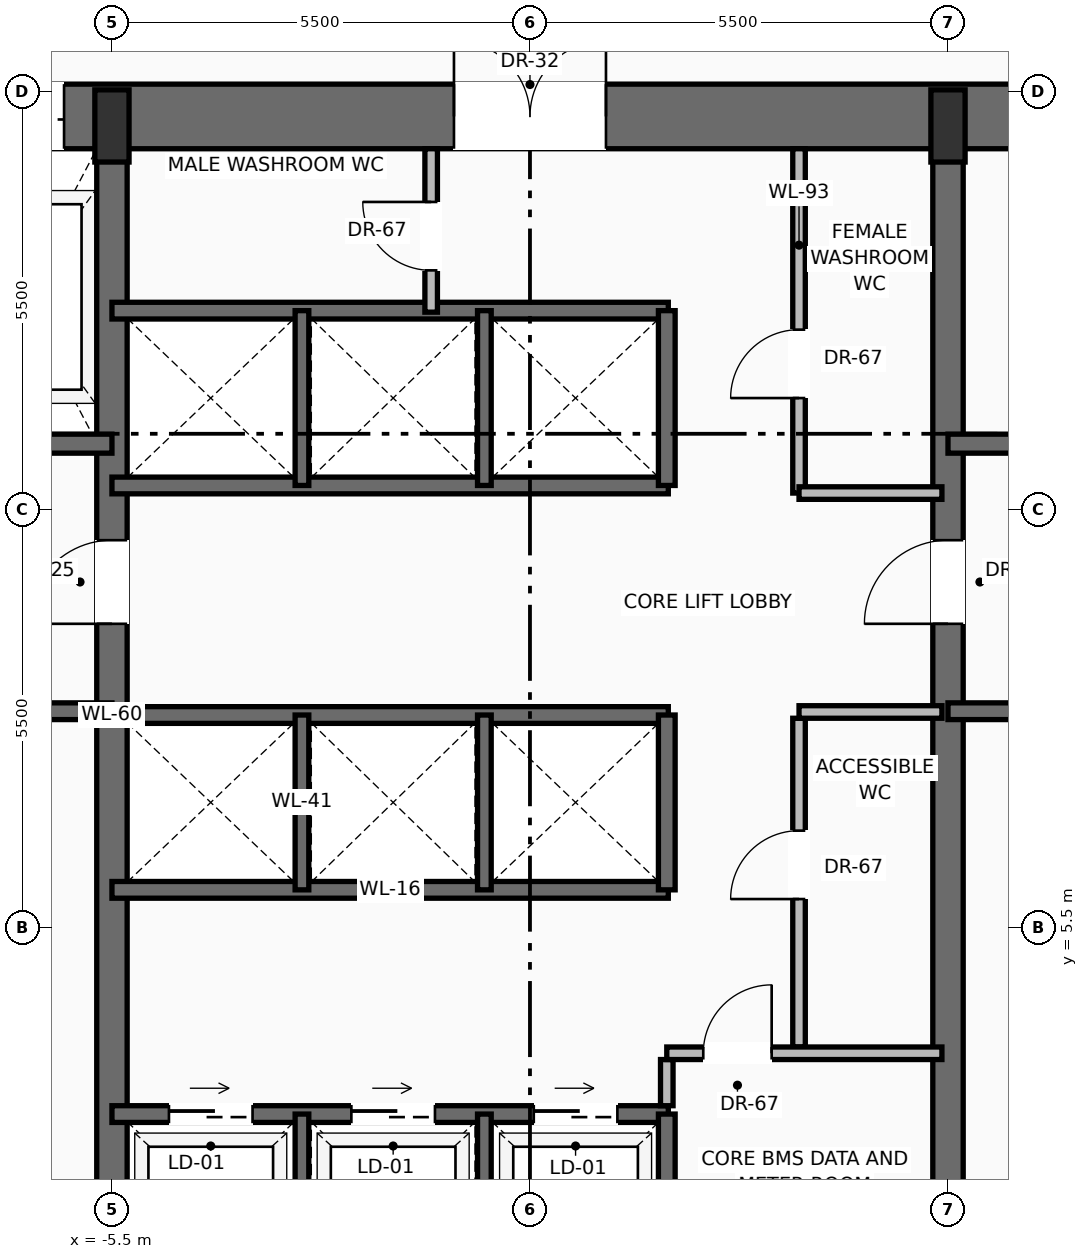
"""IFC4 building model, lengths in metres.
Left out: names, types, materials, properties, quantities, classifications, styles, units other than length and angle.
Written with IfcOpenShell. Run it as: python <this file> out.ifc"""

import sys

from ifc_helpers import new_model, si_unit, direction, frame, frame_2d, origin, origin_2d, place, context, subcontext, project, spatial, rectangle, extrude, source, transform, mapped, element, fill, save


model = new_model("IFC4")
c1 = context("Model", 3, precision=1e-05, world=origin(), true_north=direction((0.0, 1.0)))
c2 = subcontext(c1, "Body", "Model", "MODEL_VIEW")
j1 = project(units=[si_unit("LENGTHUNIT", "METRE"), si_unit("PLANEANGLEUNIT", "RADIAN")], contexts=[c1])
p1 = place(None, origin())
s1 = spatial("IfcSite", under=j1, at=p1, CompositionType="ELEMENT")
p2 = place(p1, origin())
s2 = spatial("IfcBuilding", under=s1, at=p2, CompositionType="ELEMENT")
p3 = place(p2, frame((0.0, 0.0, 27.5)))
s3 = spatial("IfcBuildingStorey", under=s2, at=p3, CompositionType="ELEMENT", Elevation=27.5)
p4 = place(p3, frame((-11.0, 16.175, 0.0), z_axis=(0.0, 0.0, 1.0), x_axis=(1.0, 0.0, 0.0)))
e1 = element("IfcWall", 1, at=p4, inside=s3, PredefinedType="SHEAR", context=c2, shape_type="SweptSolid", body=[
    extrude(rectangle(XDim=22.0, YDim=0.85, at=frame_2d((11.0, 0.0))), origin(), (0.0, 0.0, 1.0), 3.45),
])
p5 = place(p4, frame((3.57, 0.0, 0.0)))
e2 = element("IfcOpeningElement", 2, at=p5, cuts=e1, PredefinedType="OPENING", context=c2, shape_type="SweptSolid", body=[
    extrude(rectangle(XDim=1.3, YDim=2.3, at=frame_2d((0.65, 1.15))), frame((0.0, 0.435, 0.0), z_axis=(0.0, -1.0, 0.0), x_axis=(1.0, 0.0, 0.0)), (0.0, 0.0, 1.0), 0.87),
])
p6 = place(p4, frame((10.0, 0.0, 0.0)))
e3 = element("IfcOpeningElement", 3, at=p6, cuts=e1, PredefinedType="OPENING", context=c2, shape_type="SweptSolid", body=[
    extrude(rectangle(XDim=2.0, YDim=2.4, at=frame_2d((1.0, 1.2))), frame((0.0, 0.435, 0.0), z_axis=(0.0, -1.0, 0.0), x_axis=(1.0, 0.0, 0.0)), (0.0, 0.0, 1.0), 0.87),
])
p7 = place(p3, frame((-5.5, 0.425, 0.0), z_axis=(0.0, 0.0, 1.0), x_axis=(0.0, 1.0, 0.0)))
e4 = element("IfcWall", 4, at=p7, inside=s3, PredefinedType="SHEAR", context=c2, shape_type="SweptSolid", body=[
    extrude(rectangle(XDim=15.75, YDim=0.4, at=frame_2d((7.875, 0.0))), origin(), (0.0, 0.0, 1.0), 3.45),
])
p8 = place(p7, frame((9.075, 0.0, 0.0)))
e5 = element("IfcOpeningElement", 5, at=p8, cuts=e4, PredefinedType="OPENING", context=c2, shape_type="SweptSolid", body=[
    extrude(rectangle(XDim=1.1, YDim=2.2, at=frame_2d((0.55, 1.1))), frame((0.0, 0.21, 0.0), z_axis=(0.0, -1.0, 0.0), x_axis=(1.0, 0.0, 0.0)), (0.0, 0.0, 1.0), 0.42),
])
p9 = place(p3, frame((5.5, 0.425, 0.0), z_axis=(0.0, 0.0, 1.0), x_axis=(0.0, 1.0, 0.0)))
e6 = element("IfcWall", 6, at=p9, inside=s3, PredefinedType="SHEAR", context=c2, shape_type="SweptSolid", body=[
    extrude(rectangle(XDim=15.75, YDim=0.4, at=frame_2d((7.875, 0.0))), origin(), (0.0, 0.0, 1.0), 3.45),
])
p10 = place(p9, frame((9.075, 0.0, 0.0)))
e7 = element("IfcOpeningElement", 7, at=p10, cuts=e6, PredefinedType="OPENING", context=c2, shape_type="SweptSolid", body=[
    extrude(rectangle(XDim=1.1, YDim=2.2, at=frame_2d((0.55, 1.1))), frame((0.0, 0.21, 0.0), z_axis=(0.0, -1.0, 0.0), x_axis=(1.0, 0.0, 0.0)), (0.0, 0.0, 1.0), 0.42),
])
m1 = source(origin(), c2, "Body", "SweptSolid", [
    extrude(rectangle(XDim=0.45, YDim=0.95, at=origin_2d()), origin(), (0.0, 0.0, 1.0), 3.7),
])
for number, where, z_axis, x_axis in (
    (8, (-5.5, 16.05, 0.0), (0.0, 0.0, 1.0), (1.0, 0.0, 0.0)),
    (9, (5.5, 16.05, 0.0), (0.0, 0.0, 1.0), (1.0, 0.0, 0.0)),
):
    element("IfcColumn", number, at=place(p3, frame(where, z_axis=z_axis, x_axis=x_axis)), inside=s3, PredefinedType="PILASTER", context=c2, shape_type="MappedRepresentation", body=[
        mapped(m1, transform((0.0, 0.0, 0.0), scale=1.0)),
    ])
p11 = place(p3, frame((-5.5, 8.35, 0.0), z_axis=(0.0, 0.0, 1.0), x_axis=(-1.0, 0.0, 0.0)))
e10 = element("IfcWall", 10, at=p11, inside=s3, PredefinedType="SOLIDWALL", context=c2, shape_type="SweptSolid", body=[
    extrude(rectangle(XDim=4.65, YDim=0.22, at=frame_2d((2.325, 0.0))), origin(), (0.0, 0.0, 1.0), 3.45),
])
p12 = place(p11, frame((2.5, 0.0, 0.0)))
e11 = element("IfcOpeningElement", 11, at=p12, cuts=e10, PredefinedType="OPENING", context=c2, shape_type="SweptSolid", body=[
    extrude(rectangle(XDim=1.15, YDim=2.2, at=frame_2d((0.575, 1.1))), frame((0.0, 0.12, 0.0), z_axis=(0.0, -1.0, 0.0), x_axis=(1.0, 0.0, 0.0)), (0.0, 0.0, 1.0), 0.24),
])
p13 = place(p3, frame((-5.5, 11.87, 0.0), z_axis=(0.0, 0.0, 1.0), x_axis=(-1.0, 0.0, 0.0)))
e12 = element("IfcWall", 12, at=p13, inside=s3, PredefinedType="SOLIDWALL", context=c2, shape_type="SweptSolid", body=[
    extrude(rectangle(XDim=4.65, YDim=0.25, at=frame_2d((2.325, 0.0))), origin(), (0.0, 0.0, 1.0), 3.45),
])
p14 = place(p13, frame((2.95, 0.0, 0.0)))
e13 = element("IfcOpeningElement", 13, at=p14, cuts=e12, PredefinedType="OPENING", context=c2, shape_type="SweptSolid", body=[
    extrude(rectangle(XDim=1.2, YDim=2.25, at=frame_2d((0.6, 1.125))), frame((0.0, 0.135, 0.0), z_axis=(0.0, -1.0, 0.0), x_axis=(1.0, 0.0, 0.0)), (0.0, 0.0, 1.0), 0.27),
])
p15 = place(p3, frame((10.15, 8.35, 0.0), z_axis=(0.0, 0.0, 1.0), x_axis=(-1.0, 0.0, 0.0)))
e14 = element("IfcWall", 14, at=p15, inside=s3, PredefinedType="SOLIDWALL", context=c2, shape_type="SweptSolid", body=[
    extrude(rectangle(XDim=4.65, YDim=0.22, at=frame_2d((2.325, 0.0))), origin(), (0.0, 0.0, 1.0), 3.45),
])
p16 = place(p15, frame((1.0, 0.0, 0.0)))
e15 = element("IfcOpeningElement", 15, at=p16, cuts=e14, PredefinedType="OPENING", context=c2, shape_type="SweptSolid", body=[
    extrude(rectangle(XDim=1.15, YDim=2.2, at=frame_2d((0.575, 1.1))), frame((0.0, 0.12, 0.0), z_axis=(0.0, -1.0, 0.0), x_axis=(1.0, 0.0, 0.0)), (0.0, 0.0, 1.0), 0.24),
])
p17 = place(p3, frame((10.15, 11.87, 0.0), z_axis=(0.0, 0.0, 1.0), x_axis=(-1.0, 0.0, 0.0)))
e16 = element("IfcWall", 16, at=p17, inside=s3, PredefinedType="SOLIDWALL", context=c2, shape_type="SweptSolid", body=[
    extrude(rectangle(XDim=4.65, YDim=0.25, at=frame_2d((2.325, 0.0))), origin(), (0.0, 0.0, 1.0), 3.45),
])
p18 = place(p17, frame((0.5, 0.0, 0.0)))
e17 = element("IfcOpeningElement", 17, at=p18, cuts=e16, PredefinedType="OPENING", context=c2, shape_type="SweptSolid", body=[
    extrude(rectangle(XDim=1.2, YDim=2.25, at=frame_2d((0.6, 1.125))), frame((0.0, 0.135, 0.0), z_axis=(0.0, -1.0, 0.0), x_axis=(1.0, 0.0, 0.0)), (0.0, 0.0, 1.0), 0.27),
])
p19 = place(p3, frame((-5.5, 3.05, 0.0), z_axis=(0.0, 0.0, 1.0), x_axis=(1.0, 0.0, 0.0)))
e18 = element("IfcWall", 18, at=p19, inside=s3, PredefinedType="SOLIDWALL", context=c2, shape_type="SweptSolid", body=[
    extrude(rectangle(XDim=7.32, YDim=0.22, at=frame_2d((3.66, 0.0))), origin(), (0.0, 0.0, 1.0), 3.45),
])
p20 = place(p19, frame((0.75, 0.0, 0.0)))
e19 = element("IfcOpeningElement", 19, at=p20, cuts=e18, PredefinedType="OPENING", context=c2, shape_type="SweptSolid", body=[
    extrude(rectangle(XDim=1.1, YDim=2.2, at=frame_2d((0.55, 1.1))), frame((0.0, 0.12, 0.0), z_axis=(0.0, -1.0, 0.0), x_axis=(1.0, 0.0, 0.0)), (0.0, 0.0, 1.0), 0.24),
])
p21 = place(p19, frame((3.15, 0.0, 0.0)))
e20 = element("IfcOpeningElement", 20, at=p21, cuts=e18, PredefinedType="OPENING", context=c2, shape_type="SweptSolid", body=[
    extrude(rectangle(XDim=1.1, YDim=2.2, at=frame_2d((0.55, 1.1))), frame((0.0, 0.12, 0.0), z_axis=(0.0, -1.0, 0.0), x_axis=(1.0, 0.0, 0.0)), (0.0, 0.0, 1.0), 0.24),
])
p22 = place(p19, frame((5.55, 0.0, 0.0)))
e21 = element("IfcOpeningElement", 21, at=p22, cuts=e18, PredefinedType="OPENING", context=c2, shape_type="SweptSolid", body=[
    extrude(rectangle(XDim=1.1, YDim=2.2, at=frame_2d((0.55, 1.1))), frame((0.0, 0.12, 0.0), z_axis=(0.0, -1.0, 0.0), x_axis=(1.0, 0.0, 0.0)), (0.0, 0.0, 1.0), 0.24),
])
p23 = place(p3, frame((1.8, 0.85, 0.0), z_axis=(0.0, 0.0, 1.0), x_axis=(0.0, 1.0, 0.0)))
e22 = element("IfcWall", 22, at=p23, inside=s3, PredefinedType="SOLIDWALL", context=c2, shape_type="SweptSolid", body=[
    extrude(rectangle(XDim=2.2, YDim=0.22, at=frame_2d((1.1, 0.0))), origin(), (0.0, 0.0, 1.0), 3.45),
])
for number, where, z_axis, x_axis in (
    (23, (-3.0, 0.85, 0.0), (0.0, 0.0, 1.0), (0.0, 1.0, 0.0)),
    (24, (-0.6, 0.85, 0.0), (0.0, 0.0, 1.0), (0.0, 1.0, 0.0)),
):
    element("IfcWall", number, at=place(p3, frame(where, z_axis=z_axis, x_axis=x_axis)), inside=s3, PredefinedType="SOLIDWALL", context=c2, shape_type="SweptSolid", body=[
        extrude(rectangle(XDim=2.2, YDim=0.18, at=frame_2d((1.1, 0.0))), origin(), (0.0, 0.0, 1.0), 3.45),
    ])
p24 = place(p3, frame((1.8, 3.16, 0.0), z_axis=(0.0, 0.0, 1.0), x_axis=(0.0, 1.0, 0.0)))
e25 = element("IfcWall", 25, at=p24, inside=s3, PredefinedType="PARTITIONING", context=c2, shape_type="SweptSolid", body=[
    extrude(rectangle(XDim=0.608, YDim=0.165, at=frame_2d((0.304, 0.0))), origin(), (0.0, 0.0, 1.0), 3.442),
])
p25 = place(p3, frame((3.54, 3.933, 0.0), z_axis=(0.0, 0.0, 1.0), x_axis=(0.0, 1.0, 0.0)))
e26 = element("IfcWall", 26, at=p25, inside=s3, PredefinedType="PARTITIONING", context=c2, shape_type="SweptSolid", body=[
    extrude(rectangle(XDim=4.325, YDim=0.165, at=frame_2d((2.163, 0.0))), origin(), (0.0, 0.0, 1.0), 3.442),
])
p26 = place(p25, frame((1.946, 0.0, 0.0)))
e27 = element("IfcOpeningElement", 27, at=p26, cuts=e26, PredefinedType="OPENING", context=c2, shape_type="SweptSolid", body=[
    extrude(rectangle(XDim=0.9, YDim=2.1, at=frame_2d((0.45, 1.05))), frame((0.0, 0.093, 0.0), z_axis=(0.0, -1.0, 0.0), x_axis=(1.0, 0.0, 0.0)), (0.0, 0.0, 1.0), 0.185),
])
p27 = place(p3, frame((3.54, 8.34, 0.0), z_axis=(0.0, 0.0, 1.0), x_axis=(1.0, 0.0, 0.0)))
e28 = element("IfcWall", 28, at=p27, inside=s3, PredefinedType="PARTITIONING", context=c2, shape_type="SweptSolid", body=[
    extrude(rectangle(XDim=1.88, YDim=0.165, at=frame_2d((0.94, 0.0))), origin(), (0.0, 0.0, 1.0), 3.442),
])
p28 = place(p3, frame((1.8, 3.85, 0.0), z_axis=(0.0, 0.0, 1.0), x_axis=(1.0, 0.0, 0.0)))
e29 = element("IfcWall", 29, at=p28, inside=s3, PredefinedType="PARTITIONING", context=c2, shape_type="SweptSolid", body=[
    extrude(rectangle(XDim=3.62, YDim=0.165, at=frame_2d((1.81, 0.0))), origin(), (0.0, 0.0, 1.0), 3.442),
])
p29 = place(p28, frame((0.48, 0.0, 0.0)))
e30 = element("IfcOpeningElement", 30, at=p29, cuts=e29, PredefinedType="OPENING", context=c2, shape_type="SweptSolid", body=[
    extrude(rectangle(XDim=0.9, YDim=2.1, at=frame_2d((0.45, 1.05))), frame((0.0, 0.093, 0.0), z_axis=(0.0, -1.0, 0.0), x_axis=(1.0, 0.0, 0.0)), (0.0, 0.0, 1.0), 0.185),
])
for number, where, z_axis, x_axis in (
    (31, (-5.5, 6.0, 0.0), (0.0, 0.0, 1.0), (1.0, 0.0, 0.0)),
    (32, (-5.5, 8.3, 0.0), (0.0, 0.0, 1.0), (1.0, 0.0, 0.0)),
):
    element("IfcWall", number, at=place(p3, frame(where, z_axis=z_axis, x_axis=x_axis)), inside=s3, PredefinedType="SOLIDWALL", context=c2, shape_type="SweptSolid", body=[
        extrude(rectangle(XDim=7.32, YDim=0.22, at=frame_2d((3.66, 0.0))), origin(), (0.0, 0.0, 1.0), 3.45),
    ])
p30 = place(p3, frame((1.8, 6.0, 0.0), z_axis=(0.0, 0.0, 1.0), x_axis=(0.0, 1.0, 0.0)))
e33 = element("IfcWall", 33, at=p30, inside=s3, PredefinedType="SOLIDWALL", context=c2, shape_type="SweptSolid", body=[
    extrude(rectangle(XDim=2.3, YDim=0.22, at=frame_2d((1.15, 0.0))), origin(), (0.0, 0.0, 1.0), 3.45),
])
for number, where, z_axis, x_axis in (
    (34, (-3.0, 6.0, 0.0), (0.0, 0.0, 1.0), (0.0, 1.0, 0.0)),
    (35, (-0.6, 6.0, 0.0), (0.0, 0.0, 1.0), (0.0, 1.0, 0.0)),
):
    element("IfcWall", number, at=place(p3, frame(where, z_axis=z_axis, x_axis=x_axis)), inside=s3, PredefinedType="SOLIDWALL", context=c2, shape_type="SweptSolid", body=[
        extrude(rectangle(XDim=2.3, YDim=0.18, at=frame_2d((1.15, 0.0))), origin(), (0.0, 0.0, 1.0), 3.45),
    ])
for number, where, z_axis, x_axis in (
    (36, (-5.5, 11.32, 0.0), (0.0, 0.0, 1.0), (1.0, 0.0, 0.0)),
    (37, (-5.5, 13.62, 0.0), (0.0, 0.0, 1.0), (1.0, 0.0, 0.0)),
):
    element("IfcWall", number, at=place(p3, frame(where, z_axis=z_axis, x_axis=x_axis)), inside=s3, PredefinedType="SOLIDWALL", context=c2, shape_type="SweptSolid", body=[
        extrude(rectangle(XDim=7.32, YDim=0.22, at=frame_2d((3.66, 0.0))), origin(), (0.0, 0.0, 1.0), 3.45),
    ])
p31 = place(p3, frame((1.8, 11.32, 0.0), z_axis=(0.0, 0.0, 1.0), x_axis=(0.0, 1.0, 0.0)))
e38 = element("IfcWall", 38, at=p31, inside=s3, PredefinedType="SOLIDWALL", context=c2, shape_type="SweptSolid", body=[
    extrude(rectangle(XDim=2.3, YDim=0.22, at=frame_2d((1.15, 0.0))), origin(), (0.0, 0.0, 1.0), 3.45),
])
for number, where, z_axis, x_axis in (
    (39, (-3.0, 11.32, 0.0), (0.0, 0.0, 1.0), (0.0, 1.0, 0.0)),
    (40, (-0.6, 11.32, 0.0), (0.0, 0.0, 1.0), (0.0, 1.0, 0.0)),
):
    element("IfcWall", number, at=place(p3, frame(where, z_axis=z_axis, x_axis=x_axis)), inside=s3, PredefinedType="SOLIDWALL", context=c2, shape_type="SweptSolid", body=[
        extrude(rectangle(XDim=2.3, YDim=0.18, at=frame_2d((1.15, 0.0))), origin(), (0.0, 0.0, 1.0), 3.45),
    ])
p32 = place(p3, frame((-1.3, 13.6, 0.0), z_axis=(0.0, 0.0, 1.0), x_axis=(0.0, 1.0, 0.0)))
e41 = element("IfcWall", 41, at=p32, inside=s3, PredefinedType="PARTITIONING", context=c2, shape_type="SweptSolid", body=[
    extrude(rectangle(XDim=2.15, YDim=0.165, at=frame_2d((1.075, 0.0))), origin(), (0.0, 0.0, 1.0), 3.442),
])
p33 = place(p32, frame((0.55, 0.0, 0.0)))
e42 = element("IfcOpeningElement", 42, at=p33, cuts=e41, PredefinedType="OPENING", context=c2, shape_type="SweptSolid", body=[
    extrude(rectangle(XDim=0.9, YDim=2.1, at=frame_2d((0.45, 1.05))), frame((0.0, 0.093, 0.0), z_axis=(0.0, -1.0, 0.0), x_axis=(1.0, 0.0, 0.0)), (0.0, 0.0, 1.0), 0.185),
])
p34 = place(p3, frame((3.54, 11.22, 0.0), z_axis=(0.0, 0.0, 1.0), x_axis=(0.0, 1.0, 0.0)))
e43 = element("IfcWall", 43, at=p34, inside=s3, PredefinedType="PARTITIONING", context=c2, shape_type="SweptSolid", body=[
    extrude(rectangle(XDim=4.53, YDim=0.165, at=frame_2d((2.265, 0.0))), origin(), (0.0, 0.0, 1.0), 3.442),
])
p35 = place(p34, frame((1.25, 0.0, 0.0)))
e44 = element("IfcOpeningElement", 44, at=p35, cuts=e43, PredefinedType="OPENING", context=c2, shape_type="SweptSolid", body=[
    extrude(rectangle(XDim=0.9, YDim=2.1, at=frame_2d((0.45, 1.05))), frame((0.0, 0.093, 0.0), z_axis=(0.0, -1.0, 0.0), x_axis=(1.0, 0.0, 0.0)), (0.0, 0.0, 1.0), 0.185),
])
p36 = place(p3, frame((3.54, 11.22, 0.0), z_axis=(0.0, 0.0, 1.0), x_axis=(1.0, 0.0, 0.0)))
e45 = element("IfcWall", 45, at=p36, inside=s3, PredefinedType="PARTITIONING", context=c2, shape_type="SweptSolid", body=[
    extrude(rectangle(XDim=1.88, YDim=0.165, at=frame_2d((0.94, 0.0))), origin(), (0.0, 0.0, 1.0), 3.442),
])
m2 = source(origin(), c2, "Body", "SweptSolid", [
    extrude(rectangle(XDim=1.1, YDim=2.2, at=frame_2d((0.55, 1.1))), frame((0.0, 0.025, 0.0), z_axis=(0.0, -1.0, 0.0), x_axis=(1.0, 0.0, 0.0)), (0.0, 0.0, 1.0), 0.05),
])
p37 = place(p8, origin())
e46 = element("IfcDoor", 46, at=p37, inside=s3, OperationType="SINGLE_SWING_LEFT", PredefinedType="DOOR", context=c2, shape_type="MappedRepresentation", body=[
    mapped(m2, transform((0.0, 0.0, 0.0), scale=1.0)),
])
fill(e5, e46)
m3 = source(origin(), c2, "Body", "SweptSolid", [
    extrude(rectangle(XDim=1.3, YDim=2.3, at=frame_2d((0.65, 1.15))), frame((0.0, 0.025, 0.0), z_axis=(0.0, -1.0, 0.0), x_axis=(1.0, 0.0, 0.0)), (0.0, 0.0, 1.0), 0.05),
])
p38 = place(p5, origin())
e47 = element("IfcDoor", 47, at=p38, inside=s3, OperationType="SLIDING_TO_RIGHT", PredefinedType="DOOR", context=c2, shape_type="MappedRepresentation", body=[
    mapped(m3, transform((0.0, 0.0, 0.0), scale=1.0)),
])
fill(e2, e47)
p39 = place(p10, origin())
e48 = element("IfcDoor", 48, at=p39, inside=s3, OperationType="SINGLE_SWING_LEFT", PredefinedType="DOOR", context=c2, shape_type="MappedRepresentation", body=[
    mapped(m2, transform((0.0, 0.0, 0.0), scale=1.0)),
])
fill(e7, e48)
m4 = source(origin(), c2, "Body", "SweptSolid", [
    extrude(rectangle(XDim=2.0, YDim=2.4, at=frame_2d((1.0, 1.2))), frame((0.0, 0.025, 0.0), z_axis=(0.0, -1.0, 0.0), x_axis=(1.0, 0.0, 0.0)), (0.0, 0.0, 1.0), 0.05),
])
p40 = place(p6, origin())
e49 = element("IfcDoor", 49, at=p40, inside=s3, OperationType="DOUBLE_DOOR_SINGLE_SWING", PredefinedType="DOOR", context=c2, shape_type="MappedRepresentation", body=[
    mapped(m4, transform((0.0, 0.0, 0.0), scale=1.0)),
])
fill(e3, e49)
m5 = source(origin(), c2, "Body", "SweptSolid", [
    extrude(rectangle(XDim=1.1, YDim=2.2, at=frame_2d((0.55, 1.1))), frame((0.0, 0.025, 0.0), z_axis=(0.0, -1.0, 0.0), x_axis=(1.0, 0.0, 0.0)), (0.0, 0.0, 1.0), 0.05),
])
p41 = place(p20, origin())
e50 = element("IfcDoor", 50, at=p41, inside=s3, OperationType="SLIDING_TO_RIGHT", PredefinedType="DOOR", context=c2, shape_type="MappedRepresentation", body=[
    mapped(m5, transform((0.0, 0.0, 0.0), scale=1.0)),
])
fill(e19, e50)
p42 = place(p21, origin())
e51 = element("IfcDoor", 51, at=p42, inside=s3, OperationType="SLIDING_TO_RIGHT", PredefinedType="DOOR", context=c2, shape_type="MappedRepresentation", body=[
    mapped(m5, transform((0.0, 0.0, 0.0), scale=1.0)),
])
fill(e20, e51)
p43 = place(p22, origin())
e52 = element("IfcDoor", 52, at=p43, inside=s3, OperationType="SLIDING_TO_RIGHT", PredefinedType="DOOR", context=c2, shape_type="MappedRepresentation", body=[
    mapped(m5, transform((0.0, 0.0, 0.0), scale=1.0)),
])
fill(e21, e52)
m6 = source(origin(), c2, "Body", "SweptSolid", [
    extrude(rectangle(XDim=0.9, YDim=2.1, at=frame_2d((0.45, 1.05))), frame((0.0, 0.025, 0.0), z_axis=(0.0, -1.0, 0.0), x_axis=(1.0, 0.0, 0.0)), (0.0, 0.0, 1.0), 0.05),
])
p44 = place(p29, origin())
e53 = element("IfcDoor", 53, at=p44, inside=s3, OperationType="SINGLE_SWING_RIGHT", PredefinedType="DOOR", context=c2, shape_type="MappedRepresentation", body=[
    mapped(m6, transform((0.0, 0.0, 0.0), scale=1.0)),
])
fill(e30, e53)
p45 = place(p26, origin())
e54 = element("IfcDoor", 54, at=p45, inside=s3, OperationType="SINGLE_SWING_LEFT", PredefinedType="DOOR", context=c2, shape_type="MappedRepresentation", body=[
    mapped(m6, transform((0.0, 0.0, 0.0), scale=1.0)),
])
fill(e27, e54)
p46 = place(p33, origin())
e55 = element("IfcDoor", 55, at=p46, inside=s3, OperationType="SINGLE_SWING_RIGHT", PredefinedType="DOOR", context=c2, shape_type="MappedRepresentation", body=[
    mapped(m6, transform((0.0, 0.0, 0.0), scale=1.0)),
])
fill(e42, e55)
p47 = place(p35, origin())
e56 = element("IfcDoor", 56, at=p47, inside=s3, OperationType="SINGLE_SWING_LEFT", PredefinedType="DOOR", context=c2, shape_type="MappedRepresentation", body=[
    mapped(m6, transform((0.0, 0.0, 0.0), scale=1.0)),
])
fill(e44, e56)
save(model, sys.argv[1])
